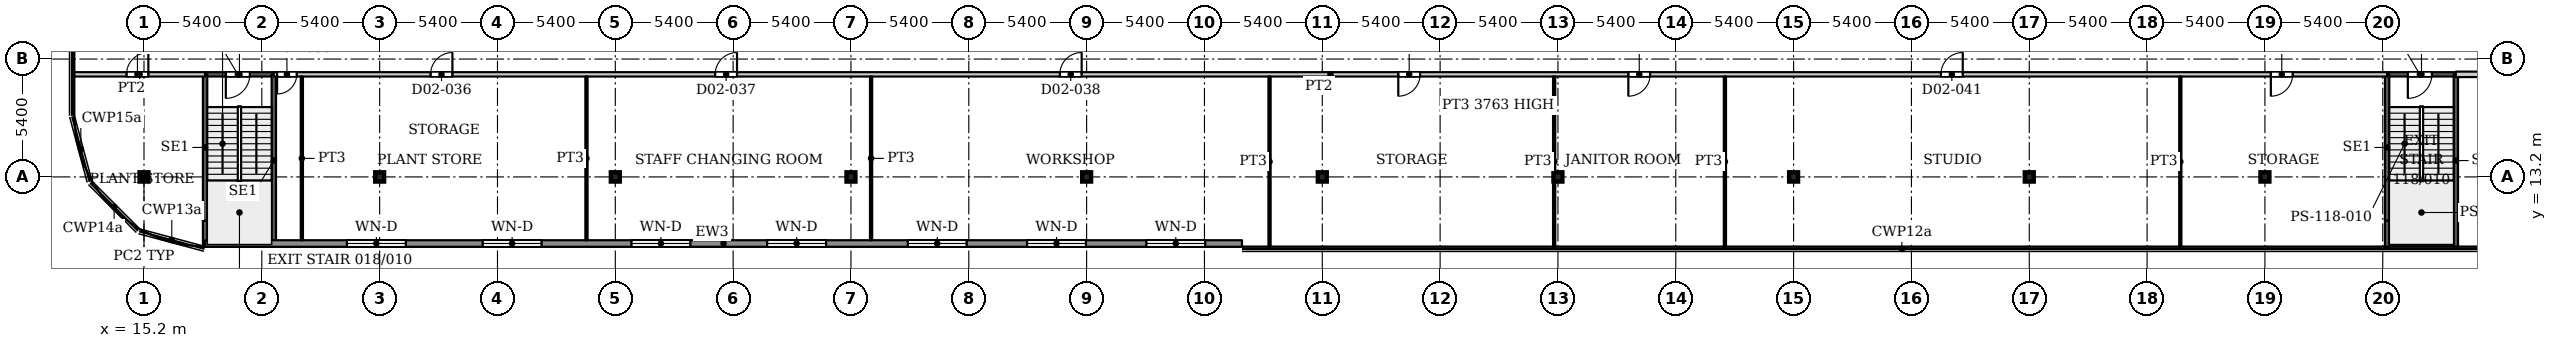
"""IFC4 building model, lengths in metres.
Left out: names, types, materials, properties, quantities, classifications, styles, units other than length and angle.
Written with IfcOpenShell. Run it as: python <this file> out.ifc"""

import sys

from ifc_helpers import new_model, si_unit, direction, frame, frame_2d, origin, origin_2d, place, context, subcontext, project, spatial, rectangle, i_section, extrude, source, transform, mapped, element, fill, save


model = new_model("IFC4")
c1 = context("Model", 3, precision=1e-05, world=origin(), true_north=direction((0.0, 1.0)))
c2 = subcontext(c1, "Body", "Model", "MODEL_VIEW")
j1 = project(units=[si_unit("LENGTHUNIT", "METRE"), si_unit("PLANEANGLEUNIT", "RADIAN")], contexts=[c1])
p1 = place(None, origin())
s1 = spatial("IfcSite", under=j1, at=p1, CompositionType="ELEMENT")
p2 = place(p1, origin())
s2 = spatial("IfcBuilding", under=s1, at=p2, CompositionType="ELEMENT")
p3 = place(p2, frame((0.0, 0.0, 12.5)))
s3 = spatial("IfcBuildingStorey", under=s2, at=p3, CompositionType="ELEMENT", Elevation=12.5)
for number, where, z_axis, x_axis in (
    (1, (15.2, 13.2, 0.0), (0.0, 0.0, 1.0), (1.0, 0.0, 0.0)),
    (2, (26.0, 13.2, 0.0), (0.0, 0.0, 1.0), (1.0, 0.0, 0.0)),
    (3, (36.8, 13.2, 0.0), (0.0, 0.0, 1.0), (1.0, 0.0, 0.0)),
    (4, (47.6, 13.2, 0.0), (0.0, 0.0, 1.0), (1.0, 0.0, 0.0)),
    (5, (58.4, 13.2, 0.0), (0.0, 0.0, 1.0), (1.0, 0.0, 0.0)),
    (6, (69.2, 13.2, 0.0), (0.0, 0.0, 1.0), (1.0, 0.0, 0.0)),
    (7, (80.0, 13.2, 0.0), (0.0, 0.0, 1.0), (1.0, 0.0, 0.0)),
    (8, (90.8, 13.2, 0.0), (0.0, 0.0, 1.0), (1.0, 0.0, 0.0)),
    (9, (101.6, 13.2, 0.0), (0.0, 0.0, 1.0), (1.0, 0.0, 0.0)),
    (10, (112.4, 13.2, 0.0), (0.0, 0.0, 1.0), (1.0, 0.0, 0.0)),
):
    element("IfcColumn", number, at=place(p3, frame(where, z_axis=z_axis, x_axis=x_axis)), inside=s3, PredefinedType="COLUMN", context=c2, shape_type="SweptSolid", body=[
        extrude(i_section(OverallWidth=0.409, OverallDepth=0.425, WebThickness=0.033, FlangeThickness=0.052, FilletRadius=0.013, at=origin_2d()), origin(), (0.0, 0.0, 1.0), 4.5),
    ])
p4 = place(p3, frame((65.52, 10.15, 0.0), z_axis=(0.0, 0.0, 1.0), x_axis=(-1.0, 0.0, 0.0)))
e11 = element("IfcWall", 11, at=p4, inside=s3, PredefinedType="SOLIDWALL", context=c2, shape_type="SweptSolid", body=[
    extrude(rectangle(XDim=47.52, YDim=0.3, at=frame_2d((23.76, 0.0))), origin(), (0.0, 0.0, 1.0), 4.25),
])
p5 = place(p4, frame((1.683, 0.0, 0.9)))
e12 = element("IfcOpeningElement", 12, at=p5, cuts=e11, PredefinedType="OPENING", context=c2, shape_type="SweptSolid", body=[
    extrude(rectangle(XDim=2.7, YDim=2.1, at=frame_2d((1.35, 1.05))), frame((0.0, 0.16, 0.0), z_axis=(0.0, -1.0, 0.0), x_axis=(1.0, 0.0, 0.0)), (0.0, 0.0, 1.0), 0.32),
])
p6 = place(p4, frame((7.15, 0.0, 0.9)))
e13 = element("IfcOpeningElement", 13, at=p6, cuts=e11, PredefinedType="OPENING", context=c2, shape_type="SweptSolid", body=[
    extrude(rectangle(XDim=2.7, YDim=2.1, at=frame_2d((1.35, 1.05))), frame((0.0, 0.16, 0.0), z_axis=(0.0, -1.0, 0.0), x_axis=(1.0, 0.0, 0.0)), (0.0, 0.0, 1.0), 0.32),
])
p7 = place(p4, frame((12.617, 0.0, 0.9)))
e14 = element("IfcOpeningElement", 14, at=p7, cuts=e11, PredefinedType="OPENING", context=c2, shape_type="SweptSolid", body=[
    extrude(rectangle(XDim=2.7, YDim=2.1, at=frame_2d((1.35, 1.05))), frame((0.0, 0.16, 0.0), z_axis=(0.0, -1.0, 0.0), x_axis=(1.0, 0.0, 0.0)), (0.0, 0.0, 1.0), 0.32),
])
p8 = place(p4, frame((19.06, 0.0, 0.9)))
e15 = element("IfcOpeningElement", 15, at=p8, cuts=e11, PredefinedType="OPENING", context=c2, shape_type="SweptSolid", body=[
    extrude(rectangle(XDim=2.7, YDim=2.1, at=frame_2d((1.35, 1.05))), frame((0.0, 0.16, 0.0), z_axis=(0.0, -1.0, 0.0), x_axis=(1.0, 0.0, 0.0)), (0.0, 0.0, 1.0), 0.32),
])
p9 = place(p4, frame((25.28, 0.0, 0.9)))
e16 = element("IfcOpeningElement", 16, at=p9, cuts=e11, PredefinedType="OPENING", context=c2, shape_type="SweptSolid", body=[
    extrude(rectangle(XDim=2.7, YDim=2.1, at=frame_2d((1.35, 1.05))), frame((0.0, 0.16, 0.0), z_axis=(0.0, -1.0, 0.0), x_axis=(1.0, 0.0, 0.0)), (0.0, 0.0, 1.0), 0.32),
])
p10 = place(p4, frame((32.1, 0.0, 0.9)))
e17 = element("IfcOpeningElement", 17, at=p10, cuts=e11, PredefinedType="OPENING", context=c2, shape_type="SweptSolid", body=[
    extrude(rectangle(XDim=2.7, YDim=2.1, at=frame_2d((1.35, 1.05))), frame((0.0, 0.16, 0.0), z_axis=(0.0, -1.0, 0.0), x_axis=(1.0, 0.0, 0.0)), (0.0, 0.0, 1.0), 0.32),
])
p11 = place(p4, frame((38.32, 0.0, 0.9)))
e18 = element("IfcOpeningElement", 18, at=p11, cuts=e11, PredefinedType="OPENING", context=c2, shape_type="SweptSolid", body=[
    extrude(rectangle(XDim=2.7, YDim=2.1, at=frame_2d((1.35, 1.05))), frame((0.0, 0.16, 0.0), z_axis=(0.0, -1.0, 0.0), x_axis=(1.0, 0.0, 0.0)), (0.0, 0.0, 1.0), 0.32),
])
p12 = place(p3, frame((18.0, 17.9, 0.0), z_axis=(0.0, 0.0, 1.0), x_axis=(1.0, 0.0, 0.0)))
e19 = element("IfcWall", 19, at=p12, inside=s3, PredefinedType="SHEAR", context=c2, shape_type="SweptSolid", body=[
    extrude(rectangle(XDim=3.15, YDim=0.2, at=frame_2d((1.575, 0.0))), origin(), (0.0, 0.0, 1.0), 4.5),
])
p13 = place(p12, frame((0.95, 0.0, 0.0)))
e20 = element("IfcOpeningElement", 20, at=p13, cuts=e19, PredefinedType="OPENING", context=c2, shape_type="SweptSolid", body=[
    extrude(rectangle(XDim=1.1, YDim=2.2, at=frame_2d((0.55, 1.1))), frame((0.0, 0.11, 0.0), z_axis=(0.0, -1.0, 0.0), x_axis=(1.0, 0.0, 0.0)), (0.0, 0.0, 1.0), 0.22),
])
p14 = place(p3, frame((18.0, 10.0, 0.0), z_axis=(0.0, 0.0, 1.0), x_axis=(0.0, 1.0, 0.0)))
e21 = element("IfcWall", 21, at=p14, inside=s3, PredefinedType="SHEAR", context=c2, shape_type="SweptSolid", body=[
    extrude(rectangle(XDim=1.2, YDim=0.2, at=frame_2d((0.6, 0.0))), origin(), (0.0, 0.0, 1.0), 4.5),
])
p15 = place(p3, frame((18.0, 11.2, 0.0), z_axis=(0.0, 0.0, 1.0), x_axis=(0.0, 1.0, 0.0)))
e22 = element("IfcWall", 22, at=p15, inside=s3, PredefinedType="SHEAR", context=c2, shape_type="SweptSolid", body=[
    extrude(rectangle(XDim=6.7, YDim=0.2, at=frame_2d((3.35, 0.0))), origin(), (0.0, 0.0, 1.0), 4.5),
])
p16 = place(p3, frame((21.15, 10.0, 0.0), z_axis=(0.0, 0.0, 1.0), x_axis=(0.0, 1.0, 0.0)))
e23 = element("IfcWall", 23, at=p16, inside=s3, PredefinedType="SHEAR", context=c2, shape_type="SweptSolid", body=[
    extrude(rectangle(XDim=7.9, YDim=0.2, at=frame_2d((3.95, 0.0))), origin(), (0.0, 0.0, 1.0), 4.5),
])
p17 = place(p3, frame((118.0, 17.9, 0.0), z_axis=(0.0, 0.0, 1.0), x_axis=(1.0, 0.0, 0.0)))
e24 = element("IfcWall", 24, at=p17, inside=s3, PredefinedType="SHEAR", context=c2, shape_type="SweptSolid", body=[
    extrude(rectangle(XDim=3.15, YDim=0.2, at=frame_2d((1.575, 0.0))), origin(), (0.0, 0.0, 1.0), 4.5),
])
p18 = place(p17, frame((0.95, 0.0, 0.0)))
e25 = element("IfcOpeningElement", 25, at=p18, cuts=e24, PredefinedType="OPENING", context=c2, shape_type="SweptSolid", body=[
    extrude(rectangle(XDim=1.1, YDim=2.2, at=frame_2d((0.55, 1.1))), frame((0.0, 0.11, 0.0), z_axis=(0.0, -1.0, 0.0), x_axis=(1.0, 0.0, 0.0)), (0.0, 0.0, 1.0), 0.22),
])
p19 = place(p3, frame((118.0, 10.0, 0.0), z_axis=(0.0, 0.0, 1.0), x_axis=(0.0, 1.0, 0.0)))
e26 = element("IfcWall", 26, at=p19, inside=s3, PredefinedType="SHEAR", context=c2, shape_type="SweptSolid", body=[
    extrude(rectangle(XDim=1.2, YDim=0.2, at=frame_2d((0.6, 0.0))), origin(), (0.0, 0.0, 1.0), 4.5),
])
p20 = place(p3, frame((118.0, 11.2, 0.0), z_axis=(0.0, 0.0, 1.0), x_axis=(0.0, 1.0, 0.0)))
e27 = element("IfcWall", 27, at=p20, inside=s3, PredefinedType="SHEAR", context=c2, shape_type="SweptSolid", body=[
    extrude(rectangle(XDim=6.7, YDim=0.2, at=frame_2d((3.35, 0.0))), origin(), (0.0, 0.0, 1.0), 4.5),
])
p21 = place(p3, frame((121.15, 10.0, 0.0), z_axis=(0.0, 0.0, 1.0), x_axis=(0.0, 1.0, 0.0)))
e28 = element("IfcWall", 28, at=p21, inside=s3, PredefinedType="SHEAR", context=c2, shape_type="SweptSolid", body=[
    extrude(rectangle(XDim=7.9, YDim=0.2, at=frame_2d((3.95, 0.0))), origin(), (0.0, 0.0, 1.0), 4.5),
])
p22 = place(p3, frame((12.0, 17.9, 0.0), z_axis=(0.0, 0.0, 1.0), x_axis=(1.0, 0.0, 0.0)))
e29 = element("IfcWall", 29, at=p22, inside=s3, PredefinedType="PARTITIONING", context=c2, shape_type="SweptSolid", body=[
    extrude(rectangle(XDim=6.0, YDim=0.2, at=frame_2d((3.0, 0.0))), origin(), (0.0, 0.0, 1.0), 4.18),
])
p23 = place(p22, frame((2.4, 0.0, 0.0)))
e30 = element("IfcOpeningElement", 30, at=p23, cuts=e29, PredefinedType="OPENING", context=c2, shape_type="SweptSolid", body=[
    extrude(rectangle(XDim=1.0, YDim=2.1, at=frame_2d((0.5, 1.05))), frame((0.0, 0.11, 0.0), z_axis=(0.0, -1.0, 0.0), x_axis=(1.0, 0.0, 0.0)), (0.0, 0.0, 1.0), 0.22),
])
p24 = place(p3, frame((21.15, 17.9, 0.0), z_axis=(0.0, 0.0, 1.0), x_axis=(1.0, 0.0, 0.0)))
e31 = element("IfcWall", 31, at=p24, inside=s3, PredefinedType="PARTITIONING", context=c2, shape_type="SweptSolid", body=[
    extrude(rectangle(XDim=96.85, YDim=0.2, at=frame_2d((48.425, 0.0))), origin(), (0.0, 0.0, 1.0), 4.18),
])
p25 = place(p24, frame((0.15, 0.0, 0.0)))
e32 = element("IfcOpeningElement", 32, at=p25, cuts=e31, PredefinedType="OPENING", context=c2, shape_type="SweptSolid", body=[
    extrude(rectangle(XDim=0.9, YDim=2.1, at=frame_2d((0.45, 1.05))), frame((0.0, 0.11, 0.0), z_axis=(0.0, -1.0, 0.0), x_axis=(1.0, 0.0, 0.0)), (0.0, 0.0, 1.0), 0.22),
])
p26 = place(p24, frame((7.185, 0.0, 0.0)))
e33 = element("IfcOpeningElement", 33, at=p26, cuts=e31, PredefinedType="OPENING", context=c2, shape_type="SweptSolid", body=[
    extrude(rectangle(XDim=1.0, YDim=2.1, at=frame_2d((0.5, 1.05))), frame((0.0, 0.11, 0.0), z_axis=(0.0, -1.0, 0.0), x_axis=(1.0, 0.0, 0.0)), (0.0, 0.0, 1.0), 0.22),
])
p27 = place(p24, frame((20.228, 0.0, 0.0)))
e34 = element("IfcOpeningElement", 34, at=p27, cuts=e31, PredefinedType="OPENING", context=c2, shape_type="SweptSolid", body=[
    extrude(rectangle(XDim=1.0, YDim=2.1, at=frame_2d((0.5, 1.05))), frame((0.0, 0.11, 0.0), z_axis=(0.0, -1.0, 0.0), x_axis=(1.0, 0.0, 0.0)), (0.0, 0.0, 1.0), 0.22),
])
p28 = place(p24, frame((36.022, 0.0, 0.0)))
e35 = element("IfcOpeningElement", 35, at=p28, cuts=e31, PredefinedType="OPENING", context=c2, shape_type="SweptSolid", body=[
    extrude(rectangle(XDim=1.0, YDim=2.1, at=frame_2d((0.5, 1.05))), frame((0.0, 0.11, 0.0), z_axis=(0.0, -1.0, 0.0), x_axis=(1.0, 0.0, 0.0)), (0.0, 0.0, 1.0), 0.22),
])
p29 = place(p24, frame((51.533, 0.0, 0.0)))
e36 = element("IfcOpeningElement", 36, at=p29, cuts=e31, PredefinedType="OPENING", context=c2, shape_type="SweptSolid", body=[
    extrude(rectangle(XDim=1.0, YDim=2.1, at=frame_2d((0.5, 1.05))), frame((0.0, 0.11, 0.0), z_axis=(0.0, -1.0, 0.0), x_axis=(1.0, 0.0, 0.0)), (0.0, 0.0, 1.0), 0.22),
])
p30 = place(p24, frame((62.076, 0.0, 0.0)))
e37 = element("IfcOpeningElement", 37, at=p30, cuts=e31, PredefinedType="OPENING", context=c2, shape_type="SweptSolid", body=[
    extrude(rectangle(XDim=1.0, YDim=2.1, at=frame_2d((0.5, 1.05))), frame((0.0, 0.11, 0.0), z_axis=(0.0, -1.0, 0.0), x_axis=(1.0, 0.0, 0.0)), (0.0, 0.0, 1.0), 0.22),
])
p31 = place(p24, frame((76.402, 0.0, 0.0)))
e38 = element("IfcOpeningElement", 38, at=p31, cuts=e31, PredefinedType="OPENING", context=c2, shape_type="SweptSolid", body=[
    extrude(rectangle(XDim=1.0, YDim=2.1, at=frame_2d((0.5, 1.05))), frame((0.0, 0.11, 0.0), z_axis=(0.0, -1.0, 0.0), x_axis=(1.0, 0.0, 0.0)), (0.0, 0.0, 1.0), 0.22),
])
p32 = place(p24, frame((91.522, 0.0, 0.0)))
e39 = element("IfcOpeningElement", 39, at=p32, cuts=e31, PredefinedType="OPENING", context=c2, shape_type="SweptSolid", body=[
    extrude(rectangle(XDim=1.0, YDim=2.1, at=frame_2d((0.5, 1.05))), frame((0.0, 0.11, 0.0), z_axis=(0.0, -1.0, 0.0), x_axis=(1.0, 0.0, 0.0)), (0.0, 0.0, 1.0), 0.22),
])
for number, where, z_axis, x_axis in (
    (40, (22.435, 10.299, 0.0), (0.0, 0.0, 1.0), (0.0, 1.0, 0.0)),
    (41, (35.478, 10.299, 0.0), (0.0, 0.0, 1.0), (0.0, 1.0, 0.0)),
    (42, (48.522, 10.299, 0.0), (0.0, 0.0, 1.0), (0.0, 1.0, 0.0)),
):
    element("IfcWall", number, at=place(p3, frame(where, z_axis=z_axis, x_axis=x_axis)), inside=s3, PredefinedType="PARTITIONING", context=c2, shape_type="SweptSolid", body=[
        extrude(rectangle(XDim=7.501, YDim=0.1, at=frame_2d((3.75, 0.0))), origin(), (0.0, 0.0, 1.0), 4.18),
    ])
p33 = place(p3, frame((66.783, 10.0, 0.0), z_axis=(0.0, 0.0, 1.0), x_axis=(0.0, 1.0, 0.0)))
e43 = element("IfcWall", 43, at=p33, inside=s3, PredefinedType="PARTITIONING", context=c2, shape_type="SweptSolid", body=[
    extrude(rectangle(XDim=7.8, YDim=0.1, at=frame_2d((3.9, 0.0))), origin(), (0.0, 0.0, 1.0), 4.18),
])
p34 = place(p3, frame((79.826, 10.0, 0.0), z_axis=(0.0, 0.0, 1.0), x_axis=(0.0, 1.0, 0.0)))
e44 = element("IfcWall", 44, at=p34, inside=s3, PredefinedType="PARTITIONING", context=c2, shape_type="SweptSolid", body=[
    extrude(rectangle(XDim=7.8, YDim=0.1, at=frame_2d((3.9, 0.0))), origin(), (0.0, 0.0, 1.0), 3.763),
])
for number, where, z_axis, x_axis in (
    (45, (87.652, 10.0, 0.0), (0.0, 0.0, 1.0), (0.0, 1.0, 0.0)),
    (46, (108.522, 10.0, 0.0), (0.0, 0.0, 1.0), (0.0, 1.0, 0.0)),
):
    element("IfcWall", number, at=place(p3, frame(where, z_axis=z_axis, x_axis=x_axis)), inside=s3, PredefinedType="PARTITIONING", context=c2, shape_type="SweptSolid", body=[
        extrude(rectangle(XDim=7.8, YDim=0.1, at=frame_2d((3.9, 0.0))), origin(), (0.0, 0.0, 1.0), 4.18),
    ])
p35 = place(p3, frame((121.15, 17.9, 0.0), z_axis=(0.0, 0.0, 1.0), x_axis=(1.0, 0.0, 0.0)))
e47 = element("IfcWall", 47, at=p35, inside=s3, PredefinedType="PARTITIONING", context=c2, shape_type="SweptSolid", body=[
    extrude(rectangle(XDim=10.551, YDim=0.25, at=frame_2d((5.275, 0.0))), origin(), (0.0, 0.0, 1.0), 4.18),
])
p36 = place(p35, frame((5.065, 0.0, 0.0)))
e48 = element("IfcOpeningElement", 48, at=p36, cuts=e47, PredefinedType="OPENING", context=c2, shape_type="SweptSolid", body=[
    extrude(rectangle(XDim=1.0, YDim=2.1, at=frame_2d((0.5, 1.05))), frame((0.0, 0.135, 0.0), z_axis=(0.0, -1.0, 0.0), x_axis=(1.0, 0.0, 0.0)), (0.0, 0.0, 1.0), 0.27),
])
m1 = source(origin(), c2, "Body", "SweptSolid", [
    extrude(rectangle(XDim=2.7, YDim=2.1, at=frame_2d((1.35, 1.05))), frame((0.0, 0.03, 0.0), z_axis=(0.0, -1.0, 0.0), x_axis=(1.0, 0.0, 0.0)), (0.0, 0.0, 1.0), 0.06),
])
p37 = place(p5, origin())
e49 = element("IfcWindow", 49, at=p37, inside=s3, PartitioningType="SINGLE_PANEL", PredefinedType="WINDOW", context=c2, shape_type="MappedRepresentation", body=[
    mapped(m1, transform((0.0, 0.0, 0.0), x_axis=(1.0, 0.0, 0.0), y_axis=(0.0, 1.0, 0.0), z_axis=(0.0, 0.0, 1.0), scale=1.0)),
])
fill(e12, e49)
p38 = place(p6, origin())
e50 = element("IfcWindow", 50, at=p38, inside=s3, PartitioningType="SINGLE_PANEL", PredefinedType="WINDOW", context=c2, shape_type="MappedRepresentation", body=[
    mapped(m1, transform((0.0, 0.0, 0.0), x_axis=(1.0, 0.0, 0.0), y_axis=(0.0, 1.0, 0.0), z_axis=(0.0, 0.0, 1.0), scale=1.0)),
])
fill(e13, e50)
p39 = place(p7, origin())
e51 = element("IfcWindow", 51, at=p39, inside=s3, PartitioningType="SINGLE_PANEL", PredefinedType="WINDOW", context=c2, shape_type="MappedRepresentation", body=[
    mapped(m1, transform((0.0, 0.0, 0.0), x_axis=(1.0, 0.0, 0.0), y_axis=(0.0, 1.0, 0.0), z_axis=(0.0, 0.0, 1.0), scale=1.0)),
])
fill(e14, e51)
p40 = place(p8, origin())
e52 = element("IfcWindow", 52, at=p40, inside=s3, PartitioningType="SINGLE_PANEL", PredefinedType="WINDOW", context=c2, shape_type="MappedRepresentation", body=[
    mapped(m1, transform((0.0, 0.0, 0.0), x_axis=(1.0, 0.0, 0.0), y_axis=(0.0, 1.0, 0.0), z_axis=(0.0, 0.0, 1.0), scale=1.0)),
])
fill(e15, e52)
p41 = place(p9, origin())
e53 = element("IfcWindow", 53, at=p41, inside=s3, PartitioningType="SINGLE_PANEL", PredefinedType="WINDOW", context=c2, shape_type="MappedRepresentation", body=[
    mapped(m1, transform((0.0, 0.0, 0.0), x_axis=(1.0, 0.0, 0.0), y_axis=(0.0, 1.0, 0.0), z_axis=(0.0, 0.0, 1.0), scale=1.0)),
])
fill(e16, e53)
p42 = place(p10, origin())
e54 = element("IfcWindow", 54, at=p42, inside=s3, PartitioningType="SINGLE_PANEL", PredefinedType="WINDOW", context=c2, shape_type="MappedRepresentation", body=[
    mapped(m1, transform((0.0, 0.0, 0.0), x_axis=(1.0, 0.0, 0.0), y_axis=(0.0, 1.0, 0.0), z_axis=(0.0, 0.0, 1.0), scale=1.0)),
])
fill(e17, e54)
p43 = place(p11, origin())
e55 = element("IfcWindow", 55, at=p43, inside=s3, PartitioningType="SINGLE_PANEL", PredefinedType="WINDOW", context=c2, shape_type="MappedRepresentation", body=[
    mapped(m1, transform((0.0, 0.0, 0.0), x_axis=(1.0, 0.0, 0.0), y_axis=(0.0, 1.0, 0.0), z_axis=(0.0, 0.0, 1.0), scale=1.0)),
])
fill(e18, e55)
m2 = source(origin(), c2, "Body", "SweptSolid", [
    extrude(rectangle(XDim=1.1, YDim=2.2, at=frame_2d((0.55, 1.1))), frame((0.0, 0.025, 0.0), z_axis=(0.0, -1.0, 0.0), x_axis=(1.0, 0.0, 0.0)), (0.0, 0.0, 1.0), 0.05),
])
p44 = place(p13, origin())
e56 = element("IfcDoor", 56, at=p44, inside=s3, OperationType="SINGLE_SWING_RIGHT", PredefinedType="DOOR", context=c2, shape_type="MappedRepresentation", body=[
    mapped(m2, transform((0.0, 0.0, 0.0), x_axis=(1.0, 0.0, 0.0), y_axis=(0.0, 1.0, 0.0), z_axis=(0.0, 0.0, 1.0), scale=1.0)),
])
fill(e20, e56)
p45 = place(p18, origin())
e57 = element("IfcDoor", 57, at=p45, inside=s3, OperationType="SINGLE_SWING_RIGHT", PredefinedType="DOOR", context=c2, shape_type="MappedRepresentation", body=[
    mapped(m2, transform((0.0, 0.0, 0.0), x_axis=(1.0, 0.0, 0.0), y_axis=(0.0, 1.0, 0.0), z_axis=(0.0, 0.0, 1.0), scale=1.0)),
])
fill(e25, e57)
m3 = source(origin(), c2, "Body", "SweptSolid", [
    extrude(rectangle(XDim=1.0, YDim=2.1, at=frame_2d((0.5, 1.05))), frame((0.0, 0.025, 0.0), z_axis=(0.0, -1.0, 0.0), x_axis=(1.0, 0.0, 0.0)), (0.0, 0.0, 1.0), 0.05),
])
p46 = place(p23, origin())
e58 = element("IfcDoor", 58, at=p46, inside=s3, OperationType="SINGLE_SWING_LEFT", PredefinedType="DOOR", context=c2, shape_type="MappedRepresentation", body=[
    mapped(m3, transform((0.0, 0.0, 0.0), x_axis=(1.0, 0.0, 0.0), y_axis=(0.0, 1.0, 0.0), z_axis=(0.0, 0.0, 1.0), scale=1.0)),
])
fill(e30, e58)
m4 = source(origin(), c2, "Body", "SweptSolid", [
    extrude(rectangle(XDim=0.9, YDim=2.1, at=frame_2d((0.45, 1.05))), frame((0.0, 0.025, 0.0), z_axis=(0.0, -1.0, 0.0), x_axis=(1.0, 0.0, 0.0)), (0.0, 0.0, 1.0), 0.05),
])
p47 = place(p25, origin())
e59 = element("IfcDoor", 59, at=p47, inside=s3, OperationType="SINGLE_SWING_RIGHT", PredefinedType="DOOR", context=c2, shape_type="MappedRepresentation", body=[
    mapped(m4, transform((0.0, 0.0, 0.0), x_axis=(1.0, 0.0, 0.0), y_axis=(0.0, 1.0, 0.0), z_axis=(0.0, 0.0, 1.0), scale=1.0)),
])
fill(e32, e59)
p48 = place(p26, origin())
e60 = element("IfcDoor", 60, at=p48, inside=s3, OperationType="SINGLE_SWING_LEFT", PredefinedType="DOOR", context=c2, shape_type="MappedRepresentation", body=[
    mapped(m3, transform((0.0, 0.0, 0.0), x_axis=(1.0, 0.0, 0.0), y_axis=(0.0, 1.0, 0.0), z_axis=(0.0, 0.0, 1.0), scale=1.0)),
])
fill(e33, e60)
p49 = place(p27, origin())
e61 = element("IfcDoor", 61, at=p49, inside=s3, OperationType="SINGLE_SWING_LEFT", PredefinedType="DOOR", context=c2, shape_type="MappedRepresentation", body=[
    mapped(m3, transform((0.0, 0.0, 0.0), x_axis=(1.0, 0.0, 0.0), y_axis=(0.0, 1.0, 0.0), z_axis=(0.0, 0.0, 1.0), scale=1.0)),
])
fill(e34, e61)
p50 = place(p28, origin())
e62 = element("IfcDoor", 62, at=p50, inside=s3, OperationType="SINGLE_SWING_LEFT", PredefinedType="DOOR", context=c2, shape_type="MappedRepresentation", body=[
    mapped(m3, transform((0.0, 0.0, 0.0), x_axis=(1.0, 0.0, 0.0), y_axis=(0.0, 1.0, 0.0), z_axis=(0.0, 0.0, 1.0), scale=1.0)),
])
fill(e35, e62)
p51 = place(p29, origin())
e63 = element("IfcDoor", 63, at=p51, inside=s3, OperationType="SINGLE_SWING_RIGHT", PredefinedType="DOOR", context=c2, shape_type="MappedRepresentation", body=[
    mapped(m3, transform((0.0, 0.0, 0.0), x_axis=(1.0, 0.0, 0.0), y_axis=(0.0, 1.0, 0.0), z_axis=(0.0, 0.0, 1.0), scale=1.0)),
])
fill(e36, e63)
p52 = place(p30, origin())
e64 = element("IfcDoor", 64, at=p52, inside=s3, OperationType="SINGLE_SWING_RIGHT", PredefinedType="DOOR", context=c2, shape_type="MappedRepresentation", body=[
    mapped(m3, transform((0.0, 0.0, 0.0), x_axis=(1.0, 0.0, 0.0), y_axis=(0.0, 1.0, 0.0), z_axis=(0.0, 0.0, 1.0), scale=1.0)),
])
fill(e37, e64)
p53 = place(p31, origin())
e65 = element("IfcDoor", 65, at=p53, inside=s3, OperationType="SINGLE_SWING_LEFT", PredefinedType="DOOR", context=c2, shape_type="MappedRepresentation", body=[
    mapped(m3, transform((0.0, 0.0, 0.0), x_axis=(1.0, 0.0, 0.0), y_axis=(0.0, 1.0, 0.0), z_axis=(0.0, 0.0, 1.0), scale=1.0)),
])
fill(e38, e65)
p54 = place(p32, origin())
e66 = element("IfcDoor", 66, at=p54, inside=s3, OperationType="SINGLE_SWING_RIGHT", PredefinedType="DOOR", context=c2, shape_type="MappedRepresentation", body=[
    mapped(m3, transform((0.0, 0.0, 0.0), x_axis=(1.0, 0.0, 0.0), y_axis=(0.0, 1.0, 0.0), z_axis=(0.0, 0.0, 1.0), scale=1.0)),
])
fill(e39, e66)
save(model, sys.argv[1])
